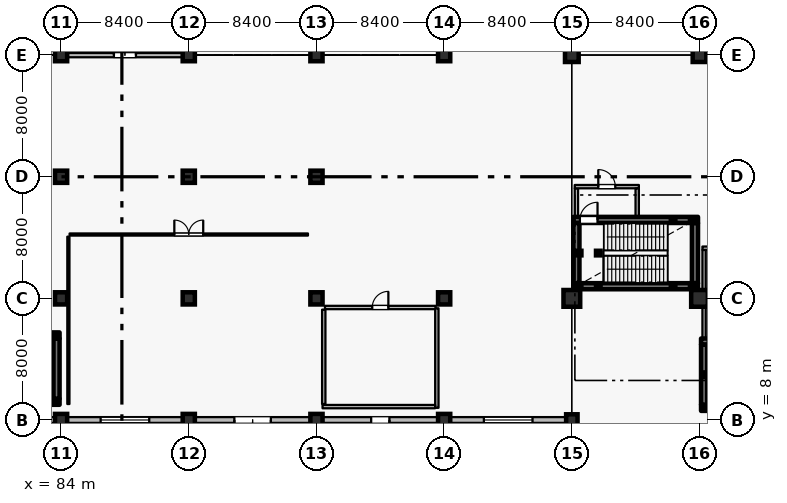
"""IFC4 building model, lengths in metres.
Left out: names, types, materials, properties, quantities, classifications, styles, units other than length and angle.
Written with IfcOpenShell. Run it as: python <this file> out.ifc"""

import sys

from ifc_helpers import new_model, si_unit, direction, frame, frame_2d, origin, origin_2d, place, context, subcontext, project, spatial, rectangle, hollow_rectangle, circle, extrude, element, fill, save


model = new_model("IFC4")
c1 = context("Model", 3, precision=1e-05, world=origin(), true_north=direction((0.0, 1.0)))
c2 = subcontext(c1, "Body", "Model", "MODEL_VIEW")
j1 = project(units=[si_unit("LENGTHUNIT", "METRE"), si_unit("PLANEANGLEUNIT", "RADIAN")], contexts=[c1])
p1 = place(None, origin())
s1 = spatial("IfcSite", under=j1, at=p1, CompositionType="ELEMENT")
p2 = place(p1, origin())
s2 = spatial("IfcBuilding", under=s1, at=p2, CompositionType="ELEMENT")
p3 = place(p2, origin())
s3 = spatial("IfcBuildingStorey", under=s2, at=p3, CompositionType="ELEMENT", Elevation=0.0)
for number, where, z_axis, x_axis in (
    (1, (84.0, 8.0, 0.0), (0.0, 0.0, 1.0), (1.0, 0.0, 0.0)),
    (2, (84.0, 16.0, 0.0), (0.0, 0.0, 1.0), (1.0, 0.0, 0.0)),
    (3, (84.0, 24.0, 0.0), (0.0, 0.0, 1.0), (1.0, 0.0, 0.0)),
    (4, (84.0, 32.0, 0.0), (0.0, 0.0, 1.0), (1.0, 0.0, 0.0)),
    (5, (92.4, 8.0, 0.0), (0.0, 0.0, 1.0), (1.0, 0.0, 0.0)),
    (6, (92.4, 16.0, 0.0), (0.0, 0.0, 1.0), (1.0, 0.0, 0.0)),
    (7, (92.4, 24.0, 0.0), (0.0, 0.0, 1.0), (1.0, 0.0, 0.0)),
    (8, (92.4, 32.0, 0.0), (0.0, 0.0, 1.0), (1.0, 0.0, 0.0)),
    (9, (100.8, 8.0, 0.0), (0.0, 0.0, 1.0), (1.0, 0.0, 0.0)),
    (10, (100.8, 16.0, 0.0), (0.0, 0.0, 1.0), (1.0, 0.0, 0.0)),
    (11, (100.8, 24.0, 0.0), (0.0, 0.0, 1.0), (1.0, 0.0, 0.0)),
    (12, (100.8, 32.0, 0.0), (0.0, 0.0, 1.0), (1.0, 0.0, 0.0)),
    (13, (109.2, 8.0, 0.0), (0.0, 0.0, 1.0), (1.0, 0.0, 0.0)),
    (14, (109.2, 16.0, 0.0), (0.0, 0.0, 1.0), (1.0, 0.0, 0.0)),
    (15, (109.2, 32.0, 0.0), (0.0, 0.0, 1.0), (1.0, 0.0, 0.0)),
):
    element("IfcColumn", number, at=place(p3, frame(where, z_axis=z_axis, x_axis=x_axis)), inside=s3, PredefinedType="COLUMN", context=c2, shape_type="SweptSolid", body=[
        extrude(rectangle(XDim=0.8, YDim=0.8, at=origin_2d()), origin(), (0.0, 0.0, 1.0), 6.0),
    ])
p4 = place(p3, frame((117.6, 8.0, 0.0), z_axis=(0.0, 0.0, 1.0), x_axis=(1.0, 0.0, 0.0)))
e16 = element("IfcColumn", 16, at=p4, inside=s3, PredefinedType="COLUMN", context=c2, shape_type="SweptSolid", body=[
    extrude(circle(Radius=0.375, at=origin_2d()), origin(), (0.0, 0.0, 1.0), 6.0),
])
p5 = place(p3, frame((117.6, 16.0, 0.0), z_axis=(0.0, 0.0, 1.0), x_axis=(1.0, 0.0, 0.0)))
e17 = element("IfcColumn", 17, at=p5, inside=s3, PredefinedType="COLUMN", context=c2, shape_type="SweptSolid", body=[
    extrude(circle(Radius=0.55, at=origin_2d()), origin(), (0.0, 0.0, 1.0), 6.0),
])
p6 = place(p3, frame((117.6, 32.0, 0.0), z_axis=(0.0, 0.0, 1.0), x_axis=(1.0, 0.0, 0.0)))
e18 = element("IfcColumn", 18, at=p6, inside=s3, PredefinedType="COLUMN", context=c2, shape_type="SweptSolid", body=[
    extrude(circle(Radius=0.45, at=origin_2d()), origin(), (0.0, 0.0, 1.0), 6.0),
])
p7 = place(p3, frame((126.0, 16.0, 0.0), z_axis=(0.0, 0.0, 1.0), x_axis=(1.0, 0.0, 0.0)))
e19 = element("IfcColumn", 19, at=p7, inside=s3, PredefinedType="COLUMN", context=c2, shape_type="SweptSolid", body=[
    extrude(circle(Radius=0.55, at=origin_2d()), origin(), (0.0, 0.0, 1.0), 6.0),
])
p8 = place(p3, frame((126.0, 32.0, 0.0), z_axis=(0.0, 0.0, 1.0), x_axis=(1.0, 0.0, 0.0)))
e20 = element("IfcColumn", 20, at=p8, inside=s3, PredefinedType="COLUMN", context=c2, shape_type="SweptSolid", body=[
    extrude(circle(Radius=0.45, at=origin_2d()), origin(), (0.0, 0.0, 1.0), 6.0),
])
p9 = place(p3, frame((117.225, 8.0, 0.0), z_axis=(0.0, 0.0, 1.0), x_axis=(-1.0, 0.0, 0.0)))
e21 = element("IfcWall", 21, at=p9, inside=s3, PredefinedType="SOLIDWALL", context=c2, shape_type="SweptSolid", body=[
    extrude(rectangle(XDim=7.625, YDim=0.38, at=frame_2d((3.812, 0.0))), origin(), (0.0, 0.0, 1.0), 5.0),
])
p10 = place(p9, frame((2.212, 0.0, 0.95)))
e22 = element("IfcOpeningElement", 22, at=p10, cuts=e21, PredefinedType="OPENING", context=c2, shape_type="SweptSolid", body=[
    extrude(rectangle(XDim=3.2, YDim=2.4, at=frame_2d((1.6, 1.2))), frame((0.0, 0.2, 0.0), z_axis=(0.0, -1.0, 0.0), x_axis=(1.0, 0.0, 0.0)), (0.0, 0.0, 1.0), 0.4),
])
p11 = place(p3, frame((108.8, 8.0, 0.0), z_axis=(0.0, 0.0, 1.0), x_axis=(-1.0, 0.0, 0.0)))
e23 = element("IfcWall", 23, at=p11, inside=s3, PredefinedType="SOLIDWALL", context=c2, shape_type="SweptSolid", body=[
    extrude(rectangle(XDim=7.6, YDim=0.38, at=frame_2d((3.8, 0.0))), origin(), (0.0, 0.0, 1.0), 5.0),
])
p12 = place(p11, frame((3.2, 0.0, 0.0)))
e24 = element("IfcOpeningElement", 24, at=p12, cuts=e23, PredefinedType="OPENING", context=c2, shape_type="SweptSolid", body=[
    extrude(rectangle(XDim=1.2, YDim=2.3, at=frame_2d((0.6, 1.15))), frame((0.0, 0.2, 0.0), z_axis=(0.0, -1.0, 0.0), x_axis=(1.0, 0.0, 0.0)), (0.0, 0.0, 1.0), 0.4),
])
p13 = place(p3, frame((100.4, 8.0, 0.0), z_axis=(0.0, 0.0, 1.0), x_axis=(-1.0, 0.0, 0.0)))
e25 = element("IfcWall", 25, at=p13, inside=s3, PredefinedType="SOLIDWALL", context=c2, shape_type="SweptSolid", body=[
    extrude(rectangle(XDim=7.6, YDim=0.38, at=frame_2d((3.8, 0.0))), origin(), (0.0, 0.0, 1.0), 5.0),
])
p14 = place(p13, frame((2.6, 0.0, 0.0)))
e26 = element("IfcOpeningElement", 26, at=p14, cuts=e25, PredefinedType="OPENING", context=c2, shape_type="SweptSolid", body=[
    extrude(rectangle(XDim=2.4, YDim=2.6, at=frame_2d((1.2, 1.3))), frame((0.0, 0.2, 0.0), z_axis=(0.0, -1.0, 0.0), x_axis=(1.0, 0.0, 0.0)), (0.0, 0.0, 1.0), 0.4),
])
p15 = place(p3, frame((92.0, 8.0, 0.0), z_axis=(0.0, 0.0, 1.0), x_axis=(-1.0, 0.0, 0.0)))
e27 = element("IfcWall", 27, at=p15, inside=s3, PredefinedType="SOLIDWALL", context=c2, shape_type="SweptSolid", body=[
    extrude(rectangle(XDim=7.6, YDim=0.38, at=frame_2d((3.8, 0.0))), origin(), (0.0, 0.0, 1.0), 5.0),
])
p16 = place(p15, frame((2.2, 0.0, 0.95)))
e28 = element("IfcOpeningElement", 28, at=p16, cuts=e27, PredefinedType="OPENING", context=c2, shape_type="SweptSolid", body=[
    extrude(rectangle(XDim=3.2, YDim=2.4, at=frame_2d((1.6, 1.2))), frame((0.0, 0.2, 0.0), z_axis=(0.0, -1.0, 0.0), x_axis=(1.0, 0.0, 0.0)), (0.0, 0.0, 1.0), 0.4),
])
p17 = place(p3, frame((83.6, 8.0, 0.0), z_axis=(0.0, 0.0, 1.0), x_axis=(-1.0, 0.0, 0.0)))
e29 = element("IfcWall", 29, at=p17, inside=s3, PredefinedType="SOLIDWALL", context=c2, shape_type="SweptSolid", body=[
    extrude(rectangle(XDim=7.6, YDim=0.38, at=frame_2d((3.8, 0.0))), origin(), (0.0, 0.0, 1.0), 5.0),
])
p18 = place(p17, frame((2.2, 0.0, 0.95)))
e30 = element("IfcOpeningElement", 30, at=p18, cuts=e29, PredefinedType="OPENING", context=c2, shape_type="SweptSolid", body=[
    extrude(rectangle(XDim=3.2, YDim=2.4, at=frame_2d((1.6, 1.2))), frame((0.0, 0.2, 0.0), z_axis=(0.0, -1.0, 0.0), x_axis=(1.0, 0.0, 0.0)), (0.0, 0.0, 1.0), 0.4),
])
p19 = place(p3, frame((84.4, 32.0, 0.0), z_axis=(0.0, 0.0, 1.0), x_axis=(1.0, 0.0, 0.0)))
e31 = element("IfcWall", 31, at=p19, inside=s3, PredefinedType="SOLIDWALL", context=c2, shape_type="SweptSolid", body=[
    extrude(rectangle(XDim=7.6, YDim=0.28, at=frame_2d((3.8, 0.0))), origin(), (0.0, 0.0, 1.0), 4.85),
])
p20 = place(p19, frame((3.075, 0.0, 0.0)))
e32 = element("IfcOpeningElement", 32, at=p20, cuts=e31, PredefinedType="OPENING", context=c2, shape_type="SweptSolid", body=[
    extrude(rectangle(XDim=1.45, YDim=2.25, at=frame_2d((0.725, 1.125))), frame((0.0, 0.15, 0.0), z_axis=(0.0, -1.0, 0.0), x_axis=(1.0, 0.0, 0.0)), (0.0, 0.0, 1.0), 0.3),
])
p21 = place(p3, frame((126.1, 8.8, 0.0), z_axis=(0.0, 0.0, 1.0), x_axis=(1.0, 0.0, 0.0)))
e33 = element("IfcWall", 33, at=p21, inside=s3, PredefinedType="SHEAR", context=c2, shape_type="SweptSolid", body=[
    extrude(rectangle(XDim=8.2, YDim=0.4, at=frame_2d((4.1, 0.0))), origin(), (0.0, 0.0, 1.0), 5.675),
])
p22 = place(p3, frame((126.1, 13.16, 0.0), z_axis=(0.0, 0.0, 1.0), x_axis=(1.0, 0.0, 0.0)))
e34 = element("IfcWall", 34, at=p22, inside=s3, PredefinedType="SHEAR", context=c2, shape_type="SweptSolid", body=[
    extrude(rectangle(XDim=8.2, YDim=0.4, at=frame_2d((4.1, 0.0))), origin(), (0.0, 0.0, 1.0), 5.675),
])
p23 = place(p22, frame((0.43, 0.0, 0.0)))
e35 = element("IfcOpeningElement", 35, at=p23, cuts=e34, PredefinedType="OPENING", context=c2, shape_type="SweptSolid", body=[
    extrude(rectangle(XDim=1.16, YDim=2.2, at=frame_2d((0.58, 1.1))), frame((0.0, 0.21, 0.0), z_axis=(0.0, -1.0, 0.0), x_axis=(1.0, 0.0, 0.0)), (0.0, 0.0, 1.0), 0.42),
])
p24 = place(p3, frame((126.3, 9.005, 0.0), z_axis=(0.0, 0.0, 1.0), x_axis=(0.0, 1.0, 0.0)))
e36 = element("IfcWall", 36, at=p24, inside=s3, PredefinedType="SHEAR", context=c2, shape_type="SweptSolid", body=[
    extrude(rectangle(XDim=3.95, YDim=0.4, at=frame_2d((1.975, 0.0))), origin(), (0.0, 0.0, 1.0), 5.675),
])
p25 = place(p3, frame((126.3, 13.365, 0.0), z_axis=(0.0, 0.0, 1.0), x_axis=(0.0, 1.0, 0.0)))
e37 = element("IfcWall", 37, at=p25, inside=s3, PredefinedType="PARTITIONING", context=c2, shape_type="SweptSolid", body=[
    extrude(rectangle(XDim=5.82, YDim=0.22, at=frame_2d((2.91, 0.0))), origin(), (0.0, 0.0, 1.0), 4.75),
])
p26 = place(p3, frame((126.19, 19.3, 0.0), z_axis=(0.0, 0.0, 1.0), x_axis=(1.0, 0.0, 0.0)))
e38 = element("IfcWall", 38, at=p26, inside=s3, PredefinedType="PARTITIONING", context=c2, shape_type="SweptSolid", body=[
    extrude(rectangle(XDim=3.82, YDim=0.22, at=frame_2d((1.91, 0.0))), origin(), (0.0, 0.0, 1.0), 5.675),
])
p27 = place(p26, frame((1.35, 0.0, 0.0)))
e39 = element("IfcOpeningElement", 39, at=p27, cuts=e38, PredefinedType="OPENING", context=c2, shape_type="SweptSolid", body=[
    extrude(rectangle(XDim=1.12, YDim=2.2, at=frame_2d((0.56, 1.1))), frame((0.0, 0.12, 0.0), z_axis=(0.0, -1.0, 0.0), x_axis=(1.0, 0.0, 0.0)), (0.0, 0.0, 1.0), 0.24),
])
for number, where, z_axis, x_axis in (
    (40, (126.48, 8.8, 0.0), (0.0, 0.0, 1.0), (1.0, 0.0, 0.0)),
    (41, (126.48, 10.98, 0.0), (0.0, 0.0, 1.0), (1.0, 0.0, 0.0)),
):
    element("IfcColumn", number, at=place(p3, frame(where, z_axis=z_axis, x_axis=x_axis)), inside=s3, PredefinedType="COLUMN", context=c2, shape_type="SweptSolid", body=[
        extrude(hollow_rectangle(XDim=0.3, YDim=0.3, WallThickness=0.012, at=origin_2d()), origin(), (0.0, 0.0, 1.0), 5.82),
    ])
p28 = place(p3, frame((117.7, 16.8, 0.0), z_axis=(0.0, 0.0, 1.0), x_axis=(1.0, 0.0, 0.0)))
e42 = element("IfcWall", 42, at=p28, inside=s3, PredefinedType="SHEAR", context=c2, shape_type="SweptSolid", body=[
    extrude(rectangle(XDim=8.2, YDim=0.4, at=frame_2d((4.1, 0.0))), origin(), (0.0, 0.0, 1.0), 5.675),
])
p29 = place(p3, frame((125.7, 17.005, 0.0), z_axis=(0.0, 0.0, 1.0), x_axis=(0.0, 1.0, 0.0)))
e43 = element("IfcWall", 43, at=p29, inside=s3, PredefinedType="SHEAR", context=c2, shape_type="SweptSolid", body=[
    extrude(rectangle(XDim=3.95, YDim=0.4, at=frame_2d((1.975, 0.0))), origin(), (0.0, 0.0, 1.0), 5.675),
])
p30 = place(p3, frame((117.7, 21.16, 0.0), z_axis=(0.0, 0.0, 1.0), x_axis=(1.0, 0.0, 0.0)))
e44 = element("IfcWall", 44, at=p30, inside=s3, PredefinedType="SHEAR", context=c2, shape_type="SweptSolid", body=[
    extrude(rectangle(XDim=8.2, YDim=0.4, at=frame_2d((4.1, 0.0))), origin(), (0.0, 0.0, 1.0), 5.675),
])
p31 = place(p30, frame((0.43, 0.0, 0.0)))
e45 = element("IfcOpeningElement", 45, at=p31, cuts=e44, PredefinedType="OPENING", context=c2, shape_type="SweptSolid", body=[
    extrude(rectangle(XDim=1.16, YDim=2.2, at=frame_2d((0.58, 1.1))), frame((0.0, 0.21, 0.0), z_axis=(0.0, -1.0, 0.0), x_axis=(1.0, 0.0, 0.0)), (0.0, 0.0, 1.0), 0.42),
])
p32 = place(p3, frame((117.9, 17.005, 0.0), z_axis=(0.0, 0.0, 1.0), x_axis=(0.0, 1.0, 0.0)))
e46 = element("IfcWall", 46, at=p32, inside=s3, PredefinedType="SHEAR", context=c2, shape_type="SweptSolid", body=[
    extrude(rectangle(XDim=3.95, YDim=0.4, at=frame_2d((1.975, 0.0))), origin(), (0.0, 0.0, 1.0), 5.675),
])
p33 = place(p3, frame((117.9, 21.365, 0.0), z_axis=(0.0, 0.0, 1.0), x_axis=(0.0, 1.0, 0.0)))
e47 = element("IfcWall", 47, at=p33, inside=s3, PredefinedType="PARTITIONING", context=c2, shape_type="SweptSolid", body=[
    extrude(rectangle(XDim=1.87, YDim=0.22, at=frame_2d((0.935, 0.0))), origin(), (0.0, 0.0, 1.0), 4.75),
])
p34 = place(p3, frame((117.79, 23.35, 0.0), z_axis=(0.0, 0.0, 1.0), x_axis=(1.0, 0.0, 0.0)))
e48 = element("IfcWall", 48, at=p34, inside=s3, PredefinedType="PARTITIONING", context=c2, shape_type="SweptSolid", body=[
    extrude(rectangle(XDim=4.22, YDim=0.22, at=frame_2d((2.11, 0.0))), origin(), (0.0, 0.0, 1.0), 5.675),
])
p35 = place(p34, frame((1.55, 0.0, 0.0)))
e49 = element("IfcOpeningElement", 49, at=p35, cuts=e48, PredefinedType="OPENING", context=c2, shape_type="SweptSolid", body=[
    extrude(rectangle(XDim=1.12, YDim=2.2, at=frame_2d((0.56, 1.1))), frame((0.0, 0.12, 0.0), z_axis=(0.0, -1.0, 0.0), x_axis=(1.0, 0.0, 0.0)), (0.0, 0.0, 1.0), 0.24),
])
p36 = place(p3, frame((121.9, 21.365, 0.0), z_axis=(0.0, 0.0, 1.0), x_axis=(0.0, 1.0, 0.0)))
e50 = element("IfcWall", 50, at=p36, inside=s3, PredefinedType="PARTITIONING", context=c2, shape_type="SweptSolid", body=[
    extrude(rectangle(XDim=1.87, YDim=0.22, at=frame_2d((0.935, 0.0))), origin(), (0.0, 0.0, 1.0), 5.675),
])
for number, where, z_axis, x_axis in (
    (51, (118.08, 16.8, 0.0), (0.0, 0.0, 1.0), (1.0, 0.0, 0.0)),
    (52, (118.08, 18.98, 0.0), (0.0, 0.0, 1.0), (1.0, 0.0, 0.0)),
    (53, (119.34, 16.8, 0.0), (0.0, 0.0, 1.0), (1.0, 0.0, 0.0)),
    (54, (119.34, 18.98, 0.0), (0.0, 0.0, 1.0), (1.0, 0.0, 0.0)),
):
    element("IfcColumn", number, at=place(p3, frame(where, z_axis=z_axis, x_axis=x_axis)), inside=s3, PredefinedType="COLUMN", context=c2, shape_type="SweptSolid", body=[
        extrude(hollow_rectangle(XDim=0.3, YDim=0.3, WallThickness=0.012, at=origin_2d()), origin(), (0.0, 0.0, 1.0), 5.82),
    ])
for number, where, z_axis, x_axis in (
    (55, (124.26, 16.8, -2.7), (0.0, 0.0, 1.0), (1.0, 0.0, 0.0)),
    (56, (124.26, 21.16, -2.7), (0.0, 0.0, 1.0), (1.0, 0.0, 0.0)),
    (57, (125.52, 16.8, -2.7), (0.0, 0.0, 1.0), (1.0, 0.0, 0.0)),
    (58, (125.52, 21.16, -2.7), (0.0, 0.0, 1.0), (1.0, 0.0, 0.0)),
):
    element("IfcColumn", number, at=place(p3, frame(where, z_axis=z_axis, x_axis=x_axis)), inside=s3, PredefinedType="COLUMN", context=c2, shape_type="SweptSolid", body=[
        extrude(hollow_rectangle(XDim=0.3, YDim=0.3, WallThickness=0.012, at=origin_2d()), origin(), (0.0, 0.0, 1.0), 5.52),
    ])
p37 = place(p3, frame((75.7, 9.2, 0.0), z_axis=(0.0, 0.0, 1.0), x_axis=(1.0, 0.0, 0.0)))
e59 = element("IfcWall", 59, at=p37, inside=s3, PredefinedType="SHEAR", context=c2, shape_type="SweptSolid", body=[
    extrude(rectangle(XDim=8.2, YDim=0.4, at=frame_2d((4.1, 0.0))), origin(), (0.0, 0.0, 1.0), 5.675),
])
p38 = place(p3, frame((83.7, 9.405, 0.0), z_axis=(0.0, 0.0, 1.0), x_axis=(0.0, 1.0, 0.0)))
e60 = element("IfcWall", 60, at=p38, inside=s3, PredefinedType="SHEAR", context=c2, shape_type="SweptSolid", body=[
    extrude(rectangle(XDim=3.95, YDim=0.4, at=frame_2d((1.975, 0.0))), origin(), (0.0, 0.0, 1.0), 5.675),
])
p39 = place(p3, frame((75.7, 13.56, 0.0), z_axis=(0.0, 0.0, 1.0), x_axis=(1.0, 0.0, 0.0)))
e61 = element("IfcWall", 61, at=p39, inside=s3, PredefinedType="SHEAR", context=c2, shape_type="SweptSolid", body=[
    extrude(rectangle(XDim=8.2, YDim=0.4, at=frame_2d((4.1, 0.0))), origin(), (0.0, 0.0, 1.0), 5.675),
])
p40 = place(p39, frame((0.62, 0.0, 0.0)))
e62 = element("IfcOpeningElement", 62, at=p40, cuts=e61, PredefinedType="OPENING", context=c2, shape_type="SweptSolid", body=[
    extrude(rectangle(XDim=1.16, YDim=2.2, at=frame_2d((0.58, 1.1))), frame((0.0, 0.21, 0.0), z_axis=(0.0, -1.0, 0.0), x_axis=(1.0, 0.0, 0.0)), (0.0, 0.0, 1.0), 0.42),
])
for number, where, z_axis, x_axis in (
    (63, (83.52, 9.2, -2.7), (0.0, 0.0, 1.0), (1.0, 0.0, 0.0)),
    (64, (83.52, 13.56, -2.7), (0.0, 0.0, 1.0), (1.0, 0.0, 0.0)),
):
    element("IfcColumn", number, at=place(p3, frame(where, z_axis=z_axis, x_axis=x_axis)), inside=s3, PredefinedType="COLUMN", context=c2, shape_type="SweptSolid", body=[
        extrude(hollow_rectangle(XDim=0.3, YDim=0.3, WallThickness=0.012, at=origin_2d()), origin(), (0.0, 0.0, 1.0), 5.52),
    ])
p41 = place(p3, frame((84.56, 20.2, 0.0), z_axis=(0.0, 0.0, 1.0), x_axis=(1.0, 0.0, 0.0)))
e65 = element("IfcWall", 65, at=p41, inside=s3, PredefinedType="PARTITIONING", context=c2, shape_type="SweptSolid", body=[
    extrude(rectangle(XDim=15.68, YDim=0.14, at=frame_2d((7.84, 0.0))), origin(), (0.0, 0.0, 1.0), 5.675),
])
p42 = place(p41, frame((6.89, 0.0, 0.0)))
e66 = element("IfcOpeningElement", 66, at=p42, cuts=e65, PredefinedType="OPENING", context=c2, shape_type="SweptSolid", body=[
    extrude(rectangle(XDim=1.9, YDim=2.4, at=frame_2d((0.95, 1.2))), frame((0.0, 0.08, 0.0), z_axis=(0.0, -1.0, 0.0), x_axis=(1.0, 0.0, 0.0)), (0.0, 0.0, 1.0), 0.16),
])
p43 = place(p3, frame((84.48, 9.05, 0.0), z_axis=(0.0, 0.0, 1.0), x_axis=(0.0, 1.0, 0.0)))
e67 = element("IfcWall", 67, at=p43, inside=s3, PredefinedType="PARTITIONING", context=c2, shape_type="SweptSolid", body=[
    extrude(rectangle(XDim=11.01, YDim=0.14, at=frame_2d((5.505, 0.0))), origin(), (0.0, 0.0, 1.0), 5.675),
])
p44 = place(p3, frame((101.36, 15.4, 0.0), z_axis=(0.0, 0.0, 1.0), x_axis=(1.0, 0.0, 0.0)))
e68 = element("IfcWall", 68, at=p44, inside=s3, PredefinedType="PARTITIONING", context=c2, shape_type="SweptSolid", body=[
    extrude(rectangle(XDim=7.28, YDim=0.22, at=frame_2d((3.64, 0.0))), origin(), (0.0, 0.0, 1.0), 5.675),
])
p45 = place(p44, frame((3.11, 0.0, 0.0)))
e69 = element("IfcOpeningElement", 69, at=p45, cuts=e68, PredefinedType="OPENING", context=c2, shape_type="SweptSolid", body=[
    extrude(rectangle(XDim=1.06, YDim=2.2, at=frame_2d((0.53, 1.1))), frame((0.0, 0.12, 0.0), z_axis=(0.0, -1.0, 0.0), x_axis=(1.0, 0.0, 0.0)), (0.0, 0.0, 1.0), 0.24),
])
p46 = place(p3, frame((101.28, 9.05, 0.0), z_axis=(0.0, 0.0, 1.0), x_axis=(0.0, 1.0, 0.0)))
e70 = element("IfcWall", 70, at=p46, inside=s3, PredefinedType="PARTITIONING", context=c2, shape_type="SweptSolid", body=[
    extrude(rectangle(XDim=6.21, YDim=0.22, at=frame_2d((3.105, 0.0))), origin(), (0.0, 0.0, 1.0), 5.675),
])
p47 = place(p3, frame((108.72, 8.8, 0.0), z_axis=(0.0, 0.0, 1.0), x_axis=(0.0, 1.0, 0.0)))
e71 = element("IfcWall", 71, at=p47, inside=s3, PredefinedType="PARTITIONING", context=c2, shape_type="SweptSolid", body=[
    extrude(rectangle(XDim=6.548, YDim=0.22, at=frame_2d((3.274, 0.0))), origin(), (0.0, 0.0, 1.0), 5.675),
])
p48 = place(p3, frame((101.2, 8.88, 0.0), z_axis=(0.0, 0.0, 1.0), x_axis=(1.0, 0.0, 0.0)))
e72 = element("IfcWall", 72, at=p48, inside=s3, PredefinedType="PARTITIONING", context=c2, shape_type="SweptSolid", body=[
    extrude(rectangle(XDim=7.41, YDim=0.22, at=frame_2d((3.705, 0.0))), origin(), (0.0, 0.0, 1.0), 5.675),
])
p49 = place(p10, origin())
e73 = element("IfcWindow", 73, at=p49, inside=s3, PartitioningType="DOUBLE_PANEL_VERTICAL", PredefinedType="WINDOW", context=c2, shape_type="SweptSolid", body=[
    extrude(rectangle(XDim=3.2, YDim=2.4, at=frame_2d((1.6, 1.2))), frame((0.0, 0.03, 0.0), z_axis=(0.0, -1.0, 0.0), x_axis=(1.0, 0.0, 0.0)), (0.0, 0.0, 1.0), 0.06),
])
fill(e22, e73)
p50 = place(p12, origin())
e74 = element("IfcDoor", 74, at=p50, inside=s3, OperationType="SINGLE_SWING_LEFT", PredefinedType="DOOR", context=c2, shape_type="SweptSolid", body=[
    extrude(rectangle(XDim=1.2, YDim=2.3, at=frame_2d((0.6, 1.15))), frame((0.0, 0.025, 0.0), z_axis=(0.0, -1.0, 0.0), x_axis=(1.0, 0.0, 0.0)), (0.0, 0.0, 1.0), 0.05),
])
fill(e24, e74)
p51 = place(p14, origin())
e75 = element("IfcDoor", 75, at=p51, inside=s3, OperationType="DOUBLE_DOOR_SINGLE_SWING", PredefinedType="DOOR", context=c2, shape_type="SweptSolid", body=[
    extrude(rectangle(XDim=2.4, YDim=2.6, at=frame_2d((1.2, 1.3))), frame((0.0, 0.025, 0.0), z_axis=(0.0, -1.0, 0.0), x_axis=(1.0, 0.0, 0.0)), (0.0, 0.0, 1.0), 0.05),
])
fill(e26, e75)
p52 = place(p16, origin())
e76 = element("IfcWindow", 76, at=p52, inside=s3, PartitioningType="DOUBLE_PANEL_VERTICAL", PredefinedType="WINDOW", context=c2, shape_type="SweptSolid", body=[
    extrude(rectangle(XDim=3.2, YDim=2.4, at=frame_2d((1.6, 1.2))), frame((0.0, 0.03, 0.0), z_axis=(0.0, -1.0, 0.0), x_axis=(1.0, 0.0, 0.0)), (0.0, 0.0, 1.0), 0.06),
])
fill(e28, e76)
p53 = place(p20, origin())
e77 = element("IfcDoor", 77, at=p53, inside=s3, OperationType="DOUBLE_DOOR_SINGLE_SWING", PredefinedType="DOOR", context=c2, shape_type="SweptSolid", body=[
    extrude(rectangle(XDim=1.45, YDim=2.25, at=frame_2d((0.725, 1.125))), frame((0.0, 0.025, 0.0), z_axis=(0.0, -1.0, 0.0), x_axis=(1.0, 0.0, 0.0)), (0.0, 0.0, 1.0), 0.05),
])
fill(e32, e77)
p54 = place(p31, origin())
e78 = element("IfcDoor", 78, at=p54, inside=s3, OperationType="SINGLE_SWING_RIGHT", PredefinedType="DOOR", context=c2, shape_type="SweptSolid", body=[
    extrude(rectangle(XDim=1.16, YDim=2.2, at=frame_2d((0.58, 1.1))), frame((0.0, 0.025, 0.0), z_axis=(0.0, -1.0, 0.0), x_axis=(1.0, 0.0, 0.0)), (0.0, 0.0, 1.0), 0.05),
])
fill(e45, e78)
p55 = place(p35, origin())
e79 = element("IfcDoor", 79, at=p55, inside=s3, OperationType="SINGLE_SWING_LEFT", PredefinedType="DOOR", context=c2, shape_type="SweptSolid", body=[
    extrude(rectangle(XDim=1.12, YDim=2.2, at=frame_2d((0.56, 1.1))), frame((0.0, 0.025, 0.0), z_axis=(0.0, -1.0, 0.0), x_axis=(1.0, 0.0, 0.0)), (0.0, 0.0, 1.0), 0.05),
])
fill(e49, e79)
p56 = place(p42, origin())
e80 = element("IfcDoor", 80, at=p56, inside=s3, OperationType="DOUBLE_DOOR_SINGLE_SWING", PredefinedType="DOOR", context=c2, shape_type="SweptSolid", body=[
    extrude(rectangle(XDim=1.9, YDim=2.4, at=frame_2d((0.95, 1.2))), frame((0.0, 0.025, 0.0), z_axis=(0.0, -1.0, 0.0), x_axis=(1.0, 0.0, 0.0)), (0.0, 0.0, 1.0), 0.05),
])
fill(e66, e80)
p57 = place(p45, origin())
e81 = element("IfcDoor", 81, at=p57, inside=s3, OperationType="SINGLE_SWING_RIGHT", PredefinedType="DOOR", context=c2, shape_type="SweptSolid", body=[
    extrude(rectangle(XDim=1.06, YDim=2.2, at=frame_2d((0.53, 1.1))), frame((0.0, 0.025, 0.0), z_axis=(0.0, -1.0, 0.0), x_axis=(1.0, 0.0, 0.0)), (0.0, 0.0, 1.0), 0.05),
])
fill(e69, e81)
save(model, sys.argv[1])
